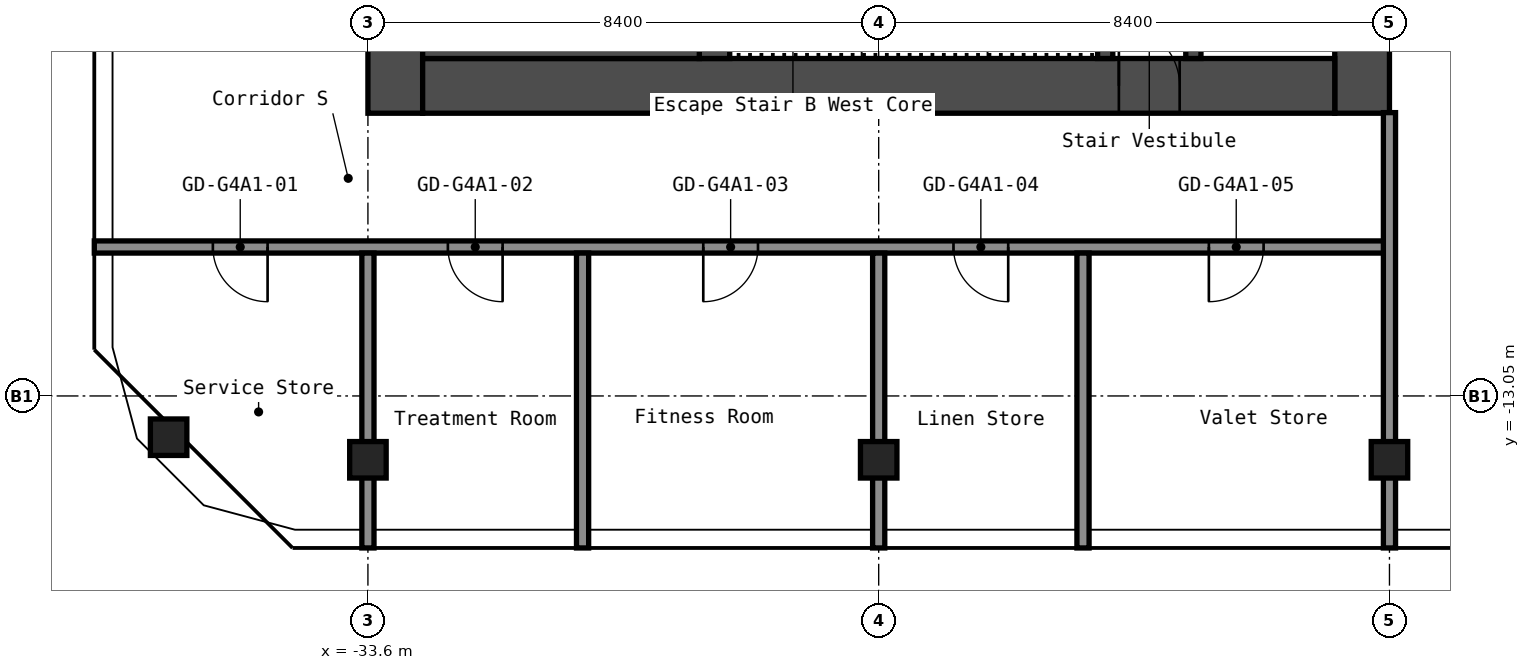
"""IFC4 building model, lengths in metres.
Left out: names, types, materials, properties, quantities, classifications, styles, units other than length and angle.
Written with IfcOpenShell. Run it as: python <this file> out.ifc"""

import sys

from ifc_helpers import new_model, si_unit, direction, frame, frame_2d, origin, origin_2d, place, context, subcontext, project, spatial, rectangle, hollow_rectangle, extrude, element, fill, save


model = new_model("IFC4")
c1 = context("Model", 3, precision=1e-05, world=origin(), true_north=direction((0.0, 1.0)))
c2 = subcontext(c1, "Body", "Model", "MODEL_VIEW")
j1 = project(units=[si_unit("LENGTHUNIT", "METRE"), si_unit("PLANEANGLEUNIT", "RADIAN")], contexts=[c1])
p1 = place(None, origin())
s1 = spatial("IfcSite", under=j1, at=p1, CompositionType="ELEMENT")
p2 = place(p1, origin())
s2 = spatial("IfcBuilding", under=s1, at=p2, CompositionType="ELEMENT")
p3 = place(p2, frame((0.0, 0.0, 202.6)))
s3 = spatial("IfcBuildingStorey", under=s2, at=p3, CompositionType="ELEMENT", Elevation=202.6)
for number, where, z_axis, x_axis in (
    (1, (-36.878, -13.729, 0.0), (0.0, 0.0, 1.0), (1.0, 0.0, 0.0)),
    (2, (-33.6, -14.1, 0.0), (0.0, 0.0, 1.0), (1.0, 0.0, 0.0)),
    (3, (-25.2, -14.1, 0.0), (0.0, 0.0, 1.0), (1.0, 0.0, 0.0)),
    (4, (-16.8, -14.1, 0.0), (0.0, 0.0, 1.0), (1.0, 0.0, 0.0)),
):
    element("IfcColumn", number, at=place(p3, frame(where, z_axis=z_axis, x_axis=x_axis)), inside=s3, PredefinedType="COLUMN", context=c2, shape_type="SweptSolid", body=[
        extrude(hollow_rectangle(XDim=0.6, YDim=0.6, WallThickness=0.025, InnerFilletRadius=0.038, OuterFilletRadius=0.062, at=origin_2d()), origin(), (0.0, 0.0, 1.0), 2.75),
    ])
p4 = place(p3, frame((-17.25, -8.4, 0.0), z_axis=(0.0, 0.0, 1.0), x_axis=(0.0, 1.0, 0.0)))
e5 = element("IfcWall", 5, at=p4, inside=s3, PredefinedType="SHEAR", context=c2, shape_type="SweptSolid", body=[
    extrude(rectangle(XDim=16.8, YDim=0.9, at=frame_2d((8.4, 0.0))), origin(), (0.0, 0.0, 1.0), 2.75),
])
p5 = place(p4, frame((10.1, 0.0, 0.0)))
e6 = element("IfcOpeningElement", 6, at=p5, cuts=e5, PredefinedType="OPENING", context=c2, shape_type="SweptSolid", body=[
    extrude(rectangle(XDim=1.6, YDim=2.1, at=frame_2d((0.8, 1.05))), frame((0.0, 0.46, 0.0), z_axis=(0.0, -1.0, 0.0), x_axis=(1.0, 0.0, 0.0)), (0.0, 0.0, 1.0), 0.92),
])
p6 = place(p3, frame((-33.15, -8.4, 0.0), z_axis=(0.0, 0.0, 1.0), x_axis=(0.0, 1.0, 0.0)))
e7 = element("IfcWall", 7, at=p6, inside=s3, PredefinedType="SHEAR", context=c2, shape_type="SweptSolid", body=[
    extrude(rectangle(XDim=16.8, YDim=0.9, at=frame_2d((8.4, 0.0))), origin(), (0.0, 0.0, 1.0), 2.75),
])
p7 = place(p3, frame((-32.7, -7.95, 0.0), z_axis=(0.0, 0.0, 1.0), x_axis=(1.0, 0.0, 0.0)))
e8 = element("IfcWall", 8, at=p7, inside=s3, PredefinedType="SHEAR", context=c2, shape_type="SweptSolid", body=[
    extrude(rectangle(XDim=15.0, YDim=0.9, at=frame_2d((7.5, 0.0))), origin(), (0.0, 0.0, 1.0), 2.75),
])
p8 = place(p7, frame((11.45, 0.0, 0.0)))
e9 = element("IfcOpeningElement", 9, at=p8, cuts=e8, PredefinedType="OPENING", context=c2, shape_type="SweptSolid", body=[
    extrude(rectangle(XDim=1.0, YDim=2.1, at=frame_2d((0.5, 1.05))), frame((0.0, 0.46, 0.0), z_axis=(0.0, -1.0, 0.0), x_axis=(1.0, 0.0, 0.0)), (0.0, 0.0, 1.0), 0.92),
])
p9 = place(p3, frame((-20.025, -7.5, 0.0), z_axis=(0.0, 0.0, 1.0), x_axis=(0.0, 1.0, 0.0)))
e10 = element("IfcWall", 10, at=p9, inside=s3, PredefinedType="SHEAR", context=c2, shape_type="SweptSolid", body=[
    extrude(rectangle(XDim=6.3, YDim=0.25, at=frame_2d((3.15, 0.0))), origin(), (0.0, 0.0, 1.0), 2.75),
])
p10 = place(p9, frame((2.4, 0.0, 0.0)))
e11 = element("IfcOpeningElement", 11, at=p10, cuts=e10, PredefinedType="OPENING", context=c2, shape_type="SweptSolid", body=[
    extrude(rectangle(XDim=1.0, YDim=2.1, at=frame_2d((0.5, 1.05))), frame((0.0, 0.135, 0.0), z_axis=(0.0, -1.0, 0.0), x_axis=(1.0, 0.0, 0.0)), (0.0, 0.0, 1.0), 0.27),
])
p11 = place(p3, frame((-21.475, -7.5, 0.0), z_axis=(0.0, 0.0, 1.0), x_axis=(0.0, 1.0, 0.0)))
e12 = element("IfcWall", 12, at=p11, inside=s3, PredefinedType="SHEAR", context=c2, shape_type="SweptSolid", body=[
    extrude(rectangle(XDim=3.75, YDim=0.25, at=frame_2d((1.875, 0.0))), origin(), (0.0, 0.0, 1.0), 2.75),
])
p12 = place(p11, frame((1.3, 0.0, 0.0)))
e13 = element("IfcOpeningElement", 13, at=p12, cuts=e12, PredefinedType="OPENING", context=c2, shape_type="SweptSolid", body=[
    extrude(rectangle(XDim=1.2, YDim=2.1, at=frame_2d((0.6, 1.05))), frame((0.0, 0.135, 0.0), z_axis=(0.0, -1.0, 0.0), x_axis=(1.0, 0.0, 0.0)), (0.0, 0.0, 1.0), 0.27),
])
p13 = place(p3, frame((-27.9, -7.5, 0.0), z_axis=(0.0, 0.0, 1.0), x_axis=(0.0, 1.0, 0.0)))
e14 = element("IfcWall", 14, at=p13, inside=s3, PredefinedType="SHEAR", context=c2, shape_type="SweptSolid", body=[
    extrude(rectangle(XDim=3.75, YDim=0.5, at=frame_2d((1.875, 0.0))), origin(), (0.0, 0.0, 1.0), 2.75),
])
p14 = place(p3, frame((-32.7, -6.75, 0.0), z_axis=(0.0, 0.0, 1.0), x_axis=(1.0, 0.0, 0.0)))
e15 = element("IfcWall", 15, at=p14, inside=s3, PredefinedType="SHEAR", context=c2, shape_type="SweptSolid", body=[
    extrude(rectangle(XDim=4.55, YDim=1.5, at=frame_2d((2.275, 0.0))), origin(), (0.0, 0.0, 1.0), 2.75),
])
p15 = place(p3, frame((-38.1, -10.6, 0.0), z_axis=(0.0, 0.0, 1.0), x_axis=(1.0, 0.0, 0.0)))
e16 = element("IfcWall", 16, at=p15, inside=s3, PredefinedType="PARTITIONING", context=c2, shape_type="SweptSolid", body=[
    extrude(rectangle(XDim=21.3, YDim=0.2, at=frame_2d((10.65, 0.0))), origin(), (0.0, 0.0, 1.0), 2.75),
])
p16 = place(p15, frame((1.95, 0.0, 0.0)))
e17 = element("IfcOpeningElement", 17, at=p16, cuts=e16, PredefinedType="OPENING", context=c2, shape_type="SweptSolid", body=[
    extrude(rectangle(XDim=0.9, YDim=2.1, at=frame_2d((0.45, 1.05))), frame((0.0, 0.11, 0.0), z_axis=(0.0, -1.0, 0.0), x_axis=(1.0, 0.0, 0.0)), (0.0, 0.0, 1.0), 0.22),
])
p17 = place(p15, frame((5.815, 0.0, 0.0)))
e18 = element("IfcOpeningElement", 18, at=p17, cuts=e16, PredefinedType="OPENING", context=c2, shape_type="SweptSolid", body=[
    extrude(rectangle(XDim=0.9, YDim=2.1, at=frame_2d((0.45, 1.05))), frame((0.0, 0.11, 0.0), z_axis=(0.0, -1.0, 0.0), x_axis=(1.0, 0.0, 0.0)), (0.0, 0.0, 1.0), 0.22),
])
p18 = place(p15, frame((10.015, 0.0, 0.0)))
e19 = element("IfcOpeningElement", 19, at=p18, cuts=e16, PredefinedType="OPENING", context=c2, shape_type="SweptSolid", body=[
    extrude(rectangle(XDim=0.9, YDim=2.1, at=frame_2d((0.45, 1.05))), frame((0.0, 0.11, 0.0), z_axis=(0.0, -1.0, 0.0), x_axis=(1.0, 0.0, 0.0)), (0.0, 0.0, 1.0), 0.22),
])
p19 = place(p15, frame((14.13, 0.0, 0.0)))
e20 = element("IfcOpeningElement", 20, at=p19, cuts=e16, PredefinedType="OPENING", context=c2, shape_type="SweptSolid", body=[
    extrude(rectangle(XDim=0.9, YDim=2.1, at=frame_2d((0.45, 1.05))), frame((0.0, 0.11, 0.0), z_axis=(0.0, -1.0, 0.0), x_axis=(1.0, 0.0, 0.0)), (0.0, 0.0, 1.0), 0.22),
])
p20 = place(p15, frame((18.33, 0.0, 0.0)))
e21 = element("IfcOpeningElement", 21, at=p20, cuts=e16, PredefinedType="OPENING", context=c2, shape_type="SweptSolid", body=[
    extrude(rectangle(XDim=0.9, YDim=2.1, at=frame_2d((0.45, 1.05))), frame((0.0, 0.11, 0.0), z_axis=(0.0, -1.0, 0.0), x_axis=(1.0, 0.0, 0.0)), (0.0, 0.0, 1.0), 0.22),
])
for number, where, z_axis, x_axis in (
    (22, (-33.6, -15.55, 0.0), (0.0, 0.0, 1.0), (0.0, 1.0, 0.0)),
    (23, (-30.07, -15.55, 0.0), (0.0, 0.0, 1.0), (0.0, 1.0, 0.0)),
    (24, (-25.2, -15.55, 0.0), (0.0, 0.0, 1.0), (0.0, 1.0, 0.0)),
    (25, (-21.84, -15.55, 0.0), (0.0, 0.0, 1.0), (0.0, 1.0, 0.0)),
):
    element("IfcWall", number, at=place(p3, frame(where, z_axis=z_axis, x_axis=x_axis)), inside=s3, PredefinedType="PARTITIONING", context=c2, shape_type="SweptSolid", body=[
        extrude(rectangle(XDim=4.85, YDim=0.2, at=frame_2d((2.425, 0.0))), origin(), (0.0, 0.0, 1.0), 2.75),
    ])
p21 = place(p3, frame((-16.8, -15.55, 0.0), z_axis=(0.0, 0.0, 1.0), x_axis=(0.0, 1.0, 0.0)))
e26 = element("IfcWall", 26, at=p21, inside=s3, PredefinedType="PARTITIONING", context=c2, shape_type="SweptSolid", body=[
    extrude(rectangle(XDim=7.16, YDim=0.2, at=frame_2d((3.58, 0.0))), origin(), (0.0, 0.0, 1.0), 2.75),
])
p22 = place(p8, origin())
e27 = element("IfcDoor", 27, at=p22, inside=s3, OperationType="SINGLE_SWING_RIGHT", PredefinedType="DOOR", context=c2, shape_type="SweptSolid", body=[
    extrude(rectangle(XDim=1.0, YDim=2.1, at=frame_2d((0.5, 1.05))), frame((0.0, 0.025, 0.0), z_axis=(0.0, -1.0, 0.0), x_axis=(1.0, 0.0, 0.0)), (0.0, 0.0, 1.0), 0.05),
])
fill(e9, e27)
p23 = place(p16, origin())
e28 = element("IfcDoor", 28, at=p23, inside=s3, OperationType="SINGLE_SWING_RIGHT", PredefinedType="DOOR", context=c2, shape_type="SweptSolid", body=[
    extrude(rectangle(XDim=0.9, YDim=2.1, at=frame_2d((0.45, 1.05))), frame((0.0, 0.025, 0.0), z_axis=(0.0, -1.0, 0.0), x_axis=(1.0, 0.0, 0.0)), (0.0, 0.0, 1.0), 0.05),
])
fill(e17, e28)
p24 = place(p17, origin())
e29 = element("IfcDoor", 29, at=p24, inside=s3, OperationType="SINGLE_SWING_RIGHT", PredefinedType="DOOR", context=c2, shape_type="SweptSolid", body=[
    extrude(rectangle(XDim=0.9, YDim=2.1, at=frame_2d((0.45, 1.05))), frame((0.0, 0.025, 0.0), z_axis=(0.0, -1.0, 0.0), x_axis=(1.0, 0.0, 0.0)), (0.0, 0.0, 1.0), 0.05),
])
fill(e18, e29)
p25 = place(p18, origin())
e30 = element("IfcDoor", 30, at=p25, inside=s3, OperationType="SINGLE_SWING_LEFT", PredefinedType="DOOR", context=c2, shape_type="SweptSolid", body=[
    extrude(rectangle(XDim=0.9, YDim=2.1, at=frame_2d((0.45, 1.05))), frame((0.0, 0.025, 0.0), z_axis=(0.0, -1.0, 0.0), x_axis=(1.0, 0.0, 0.0)), (0.0, 0.0, 1.0), 0.05),
])
fill(e19, e30)
p26 = place(p19, origin())
e31 = element("IfcDoor", 31, at=p26, inside=s3, OperationType="SINGLE_SWING_RIGHT", PredefinedType="DOOR", context=c2, shape_type="SweptSolid", body=[
    extrude(rectangle(XDim=0.9, YDim=2.1, at=frame_2d((0.45, 1.05))), frame((0.0, 0.025, 0.0), z_axis=(0.0, -1.0, 0.0), x_axis=(1.0, 0.0, 0.0)), (0.0, 0.0, 1.0), 0.05),
])
fill(e20, e31)
p27 = place(p20, origin())
e32 = element("IfcDoor", 32, at=p27, inside=s3, OperationType="SINGLE_SWING_LEFT", PredefinedType="DOOR", context=c2, shape_type="SweptSolid", body=[
    extrude(rectangle(XDim=0.9, YDim=2.1, at=frame_2d((0.45, 1.05))), frame((0.0, 0.025, 0.0), z_axis=(0.0, -1.0, 0.0), x_axis=(1.0, 0.0, 0.0)), (0.0, 0.0, 1.0), 0.05),
])
fill(e21, e32)
save(model, sys.argv[1])
